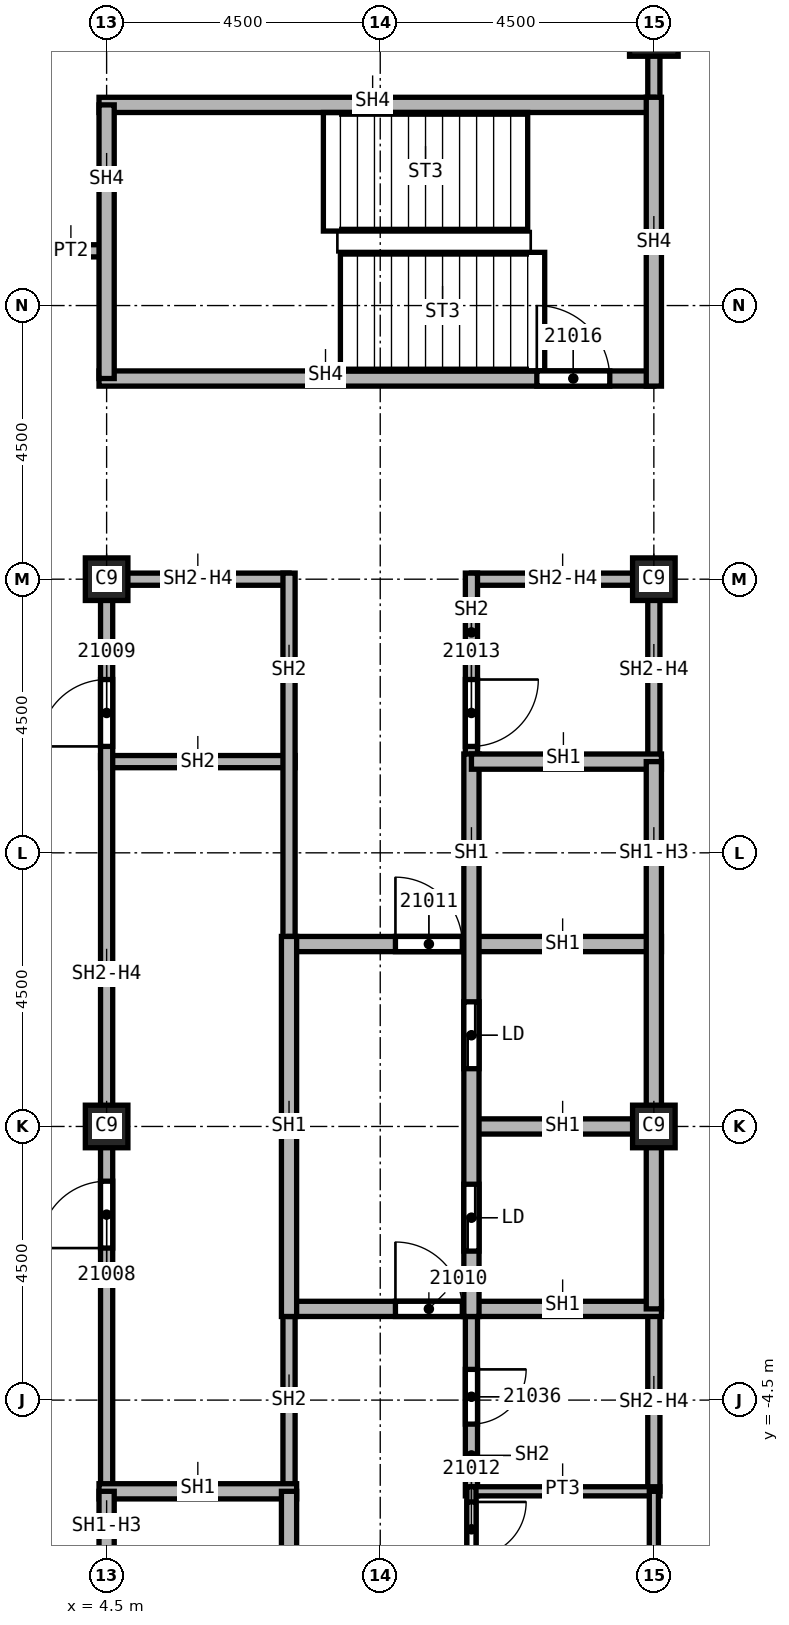
"""IFC4 building model, lengths in metres.
Left out: names, types, materials, properties, quantities, classifications, styles, units other than length and angle.
Written with IfcOpenShell. Run it as: python <this file> out.ifc"""

import sys

from ifc_helpers import new_model, si_unit, direction, frame, frame_2d, origin, origin_2d, place, context, subcontext, project, spatial, rectangle, extrude, element, fill, save


model = new_model("IFC4")
c1 = context("Model", 3, precision=1e-05, world=origin(), true_north=direction((0.0, 1.0)))
c2 = subcontext(c1, "Body", "Model", "MODEL_VIEW")
j1 = project(units=[si_unit("LENGTHUNIT", "METRE"), si_unit("PLANEANGLEUNIT", "RADIAN")], contexts=[c1])
p1 = place(None, origin())
s1 = spatial("IfcSite", under=j1, at=p1, CompositionType="ELEMENT")
p2 = place(p1, origin())
s2 = spatial("IfcBuilding", under=s1, at=p2, CompositionType="ELEMENT")
p3 = place(p2, frame((0.0, 0.0, 304.0)))
s3 = spatial("IfcBuildingStorey", under=s2, at=p3, CompositionType="ELEMENT", Elevation=304.0)
p4 = place(p3, frame((13.5, 18.0, 0.0), z_axis=(0.0, 0.0, 1.0), x_axis=(1.0, 0.0, 0.0)))
e1 = element("IfcColumn", 1, at=p4, inside=s3, PredefinedType="COLUMN", context=c2, shape_type="SweptSolid", body=[
    extrude(rectangle(XDim=0.8, YDim=0.8, at=origin_2d()), origin(), (0.0, 0.0, 1.0), 3.74),
])
for number, where, z_axis, x_axis in (
    (2, (4.5, 0.0, 0.0), (0.0, 0.0, 1.0), (1.0, 0.0, 0.0)),
    (3, (4.5, 9.0, 0.0), (0.0, 0.0, 1.0), (1.0, 0.0, 0.0)),
    (4, (13.5, 0.0, 0.0), (0.0, 0.0, 1.0), (1.0, 0.0, 0.0)),
    (5, (13.5, 9.0, 0.0), (0.0, 0.0, 1.0), (1.0, 0.0, 0.0)),
):
    element("IfcColumn", number, at=place(p3, frame(where, z_axis=z_axis, x_axis=x_axis)), inside=s3, PredefinedType="COLUMN", context=c2, shape_type="SweptSolid", body=[
        extrude(rectangle(XDim=0.7, YDim=0.7, at=origin_2d()), origin(), (0.0, 0.0, 1.0), 3.74),
    ])
p5 = place(p3, frame((3.45, 14.4, 0.0), z_axis=(0.0, 0.0, 1.0), x_axis=(1.0, 0.0, 0.0)))
e6 = element("IfcWall", 6, at=p5, inside=s3, PredefinedType="PARTITIONING", context=c2, shape_type="SweptSolid", body=[
    extrude(rectangle(XDim=1.05, YDim=0.2, at=frame_2d((0.525, 0.0))), origin(), (0.0, 0.0, 1.0), 3.74),
])
p6 = place(p3, frame((13.5, 16.675, 0.0), z_axis=(0.0, 0.0, 1.0), x_axis=(0.0, 1.0, 0.0)))
e7 = element("IfcWall", 7, at=p6, inside=s3, PredefinedType="PARTITIONING", context=c2, shape_type="SweptSolid", body=[
    extrude(rectangle(XDim=6.275, YDim=0.2, at=frame_2d((3.137, 0.0))), origin(), (0.0, 0.0, 1.0), 3.74),
])
p7 = place(p6, frame((2.65, 0.0, 0.0)))
e8 = element("IfcOpeningElement", 8, at=p7, cuts=e7, PredefinedType="OPENING", context=c2, shape_type="SweptSolid", body=[
    extrude(rectangle(XDim=1.0, YDim=2.1, at=frame_2d((0.5, 1.05))), frame((0.0, 0.1, 0.0), z_axis=(0.0, -1.0, 0.0), x_axis=(1.0, 0.0, 0.0)), (0.0, 0.0, 1.0), 0.2),
])
p8 = place(p3, frame((4.4, 6.0, 0.0), z_axis=(0.0, 0.0, 1.0), x_axis=(1.0, 0.0, 0.0)))
e9 = element("IfcWall", 9, at=p8, inside=s3, PredefinedType="SOLIDWALL", context=c2, shape_type="SweptSolid", body=[
    extrude(rectangle(XDim=3.2, YDim=0.2, at=frame_2d((1.6, 0.0))), origin(), (0.0, 0.0, 1.0), 3.74),
])
p9 = place(p3, frame((4.5, -6.0, 0.0), z_axis=(0.0, 0.0, 1.0), x_axis=(0.0, 1.0, 0.0)))
e10 = element("IfcWall", 10, at=p9, inside=s3, PredefinedType="SOLIDWALL", context=c2, shape_type="SweptSolid", body=[
    extrude(rectangle(XDim=15.1, YDim=0.2, at=frame_2d((7.55, 0.0))), origin(), (0.0, 0.0, 1.0), 3.062),
])
p10 = place(p9, frame((4.0, 0.0, 0.0)))
e11 = element("IfcOpeningElement", 11, at=p10, cuts=e10, PredefinedType="OPENING", context=c2, shape_type="SweptSolid", body=[
    extrude(rectangle(XDim=1.1, YDim=2.1, at=frame_2d((0.55, 1.05))), frame((0.0, 0.1, 0.0), z_axis=(0.0, -1.0, 0.0), x_axis=(1.0, 0.0, 0.0)), (0.0, 0.0, 1.0), 0.2),
])
p11 = place(p9, frame((12.25, 0.0, 0.0)))
e12 = element("IfcOpeningElement", 12, at=p11, cuts=e10, PredefinedType="OPENING", context=c2, shape_type="SweptSolid", body=[
    extrude(rectangle(XDim=1.1, YDim=2.1, at=frame_2d((0.55, 1.05))), frame((0.0, 0.1, 0.0), z_axis=(0.0, -1.0, 0.0), x_axis=(1.0, 0.0, 0.0)), (0.0, 0.0, 1.0), 0.2),
])
p12 = place(p3, frame((4.5, 9.0, 0.0), z_axis=(0.0, 0.0, 1.0), x_axis=(1.0, 0.0, 0.0)))
e13 = element("IfcWall", 13, at=p12, inside=s3, PredefinedType="SOLIDWALL", context=c2, shape_type="SweptSolid", body=[
    extrude(rectangle(XDim=3.0, YDim=0.2, at=frame_2d((1.5, 0.0))), origin(), (0.0, 0.0, 1.0), 3.062),
])
p13 = place(p3, frame((7.5, -2.875, 0.0), z_axis=(0.0, 0.0, 1.0), x_axis=(0.0, -1.0, 0.0)))
e14 = element("IfcWall", 14, at=p13, inside=s3, PredefinedType="SOLIDWALL", context=c2, shape_type="SweptSolid", body=[
    extrude(rectangle(XDim=3.125, YDim=0.2, at=frame_2d((1.562, 0.0))), origin(), (0.0, 0.0, 1.0), 3.74),
])
p14 = place(p3, frame((7.5, 9.1, 0.0), z_axis=(0.0, 0.0, 1.0), x_axis=(0.0, -1.0, 0.0)))
e15 = element("IfcWall", 15, at=p14, inside=s3, PredefinedType="SOLIDWALL", context=c2, shape_type="SweptSolid", body=[
    extrude(rectangle(XDim=6.225, YDim=0.2, at=frame_2d((3.113, 0.0))), origin(), (0.0, 0.0, 1.0), 3.74),
])
p15 = place(p3, frame((10.5, -2.875, 0.0), z_axis=(0.0, 0.0, 1.0), x_axis=(0.0, -1.0, 0.0)))
e16 = element("IfcWall", 16, at=p15, inside=s3, PredefinedType="SOLIDWALL", context=c2, shape_type="SweptSolid", body=[
    extrude(rectangle(XDim=3.2, YDim=0.2, at=frame_2d((1.6, 0.0))), origin(), (0.0, 0.0, 1.0), 3.74),
])
p16 = place(p15, frame((1.12, 0.0, 0.0)))
e17 = element("IfcOpeningElement", 17, at=p16, cuts=e16, PredefinedType="OPENING", context=c2, shape_type="SweptSolid", body=[
    extrude(rectangle(XDim=0.9, YDim=2.1, at=frame_2d((0.45, 1.05))), frame((0.0, 0.1, 0.0), z_axis=(0.0, -1.0, 0.0), x_axis=(1.0, 0.0, 0.0)), (0.0, 0.0, 1.0), 0.2),
])
p17 = place(p3, frame((10.5, 9.0, 0.0), z_axis=(0.0, 0.0, 1.0), x_axis=(1.0, 0.0, 0.0)))
e18 = element("IfcWall", 18, at=p17, inside=s3, PredefinedType="SOLIDWALL", context=c2, shape_type="SweptSolid", body=[
    extrude(rectangle(XDim=3.0, YDim=0.2, at=frame_2d((1.5, 0.0))), origin(), (0.0, 0.0, 1.0), 3.062),
])
p18 = place(p3, frame((10.5, 9.1, 0.0), z_axis=(0.0, 0.0, 1.0), x_axis=(0.0, -1.0, 0.0)))
e19 = element("IfcWall", 19, at=p18, inside=s3, PredefinedType="SOLIDWALL", context=c2, shape_type="SweptSolid", body=[
    extrude(rectangle(XDim=3.225, YDim=0.2, at=frame_2d((1.613, 0.0))), origin(), (0.0, 0.0, 1.0), 3.74),
])
p19 = place(p18, frame((1.75, 0.0, 0.0)))
e20 = element("IfcOpeningElement", 20, at=p19, cuts=e19, PredefinedType="OPENING", context=c2, shape_type="SweptSolid", body=[
    extrude(rectangle(XDim=1.1, YDim=2.1, at=frame_2d((0.55, 1.05))), frame((0.0, 0.1, 0.0), z_axis=(0.0, -1.0, 0.0), x_axis=(1.0, 0.0, 0.0)), (0.0, 0.0, 1.0), 0.2),
])
p20 = place(p3, frame((13.5, -3.0, 0.0), z_axis=(0.0, 0.0, 1.0), x_axis=(0.0, -1.0, 0.0)))
e21 = element("IfcWall", 21, at=p20, inside=s3, PredefinedType="SOLIDWALL", context=c2, shape_type="SweptSolid", body=[
    extrude(rectangle(XDim=3.0, YDim=0.2, at=frame_2d((1.5, 0.0))), origin(), (0.0, 0.0, 1.0), 3.062),
])
p21 = place(p3, frame((13.5, 9.1, 0.0), z_axis=(0.0, 0.0, 1.0), x_axis=(0.0, -1.0, 0.0)))
e22 = element("IfcWall", 22, at=p21, inside=s3, PredefinedType="SOLIDWALL", context=c2, shape_type="SweptSolid", body=[
    extrude(rectangle(XDim=3.1, YDim=0.2, at=frame_2d((1.55, 0.0))), origin(), (0.0, 0.0, 1.0), 3.062),
])
p22 = place(p3, frame((4.375, -6.0, 0.0), z_axis=(0.0, 0.0, 1.0), x_axis=(1.0, 0.0, 0.0)))
e23 = element("IfcWall", 23, at=p22, inside=s3, PredefinedType="SOLIDWALL", context=c2, shape_type="SweptSolid", body=[
    extrude(rectangle(XDim=3.25, YDim=0.25, at=frame_2d((1.625, 0.0))), origin(), (0.0, 0.0, 1.0), 3.74),
])
p23 = place(p3, frame((4.5, -9.125, 0.0), z_axis=(0.0, 0.0, 1.0), x_axis=(0.0, 1.0, 0.0)))
e24 = element("IfcWall", 24, at=p23, inside=s3, PredefinedType="SOLIDWALL", context=c2, shape_type="SweptSolid", body=[
    extrude(rectangle(XDim=3.125, YDim=0.25, at=frame_2d((1.562, 0.0))), origin(), (0.0, 0.0, 1.0), 3.062),
])
p24 = place(p23, frame((1.012, 0.0, 0.0)))
e25 = element("IfcOpeningElement", 25, at=p24, cuts=e24, PredefinedType="OPENING", context=c2, shape_type="SweptSolid", body=[
    extrude(rectangle(XDim=1.1, YDim=2.1, at=frame_2d((0.55, 1.05))), frame((0.0, 0.125, 0.0), z_axis=(0.0, -1.0, 0.0), x_axis=(1.0, 0.0, 0.0)), (0.0, 0.0, 1.0), 0.25),
])
p25 = place(p3, frame((7.5, -6.0, 0.0), z_axis=(0.0, 0.0, 1.0), x_axis=(0.0, -1.0, 0.0)))
e26 = element("IfcWall", 26, at=p25, inside=s3, PredefinedType="SOLIDWALL", context=c2, shape_type="SweptSolid", body=[
    extrude(rectangle(XDim=3.125, YDim=0.25, at=frame_2d((1.562, 0.0))), origin(), (0.0, 0.0, 1.0), 3.74),
])
p26 = place(p3, frame((7.5, -3.0, 0.0), z_axis=(0.0, 0.0, 1.0), x_axis=(1.0, 0.0, 0.0)))
e27 = element("IfcWall", 27, at=p26, inside=s3, PredefinedType="SOLIDWALL", context=c2, shape_type="SweptSolid", body=[
    extrude(rectangle(XDim=6.125, YDim=0.25, at=frame_2d((3.062, 0.0))), origin(), (0.0, 0.0, 1.0), 3.74),
])
p27 = place(p26, frame((1.75, 0.0, 0.0)))
e28 = element("IfcOpeningElement", 28, at=p27, cuts=e27, PredefinedType="OPENING", context=c2, shape_type="SweptSolid", body=[
    extrude(rectangle(XDim=1.1, YDim=2.1, at=frame_2d((0.55, 1.05))), frame((0.0, 0.125, 0.0), z_axis=(0.0, -1.0, 0.0), x_axis=(1.0, 0.0, 0.0)), (0.0, 0.0, 1.0), 0.25),
])
p28 = place(p3, frame((7.5, 3.0, 0.0), z_axis=(0.0, 0.0, 1.0), x_axis=(1.0, 0.0, 0.0)))
e29 = element("IfcWall", 29, at=p28, inside=s3, PredefinedType="SOLIDWALL", context=c2, shape_type="SweptSolid", body=[
    extrude(rectangle(XDim=6.125, YDim=0.25, at=frame_2d((3.062, 0.0))), origin(), (0.0, 0.0, 1.0), 3.74),
])
p29 = place(p28, frame((1.75, 0.0, 0.0)))
e30 = element("IfcOpeningElement", 30, at=p29, cuts=e29, PredefinedType="OPENING", context=c2, shape_type="SweptSolid", body=[
    extrude(rectangle(XDim=1.1, YDim=2.1, at=frame_2d((0.55, 1.05))), frame((0.0, 0.125, 0.0), z_axis=(0.0, -1.0, 0.0), x_axis=(1.0, 0.0, 0.0)), (0.0, 0.0, 1.0), 0.25),
])
p30 = place(p3, frame((7.5, 3.125, 0.0), z_axis=(0.0, 0.0, 1.0), x_axis=(0.0, -1.0, 0.0)))
e31 = element("IfcWall", 31, at=p30, inside=s3, PredefinedType="SOLIDWALL", context=c2, shape_type="SweptSolid", body=[
    extrude(rectangle(XDim=6.25, YDim=0.25, at=frame_2d((3.125, 0.0))), origin(), (0.0, 0.0, 1.0), 3.74),
])
p31 = place(p3, frame((10.5, 0.0, 0.0), z_axis=(0.0, 0.0, 1.0), x_axis=(1.0, 0.0, 0.0)))
e32 = element("IfcWall", 32, at=p31, inside=s3, PredefinedType="SOLIDWALL", context=c2, shape_type="SweptSolid", body=[
    extrude(rectangle(XDim=3.125, YDim=0.25, at=frame_2d((1.562, 0.0))), origin(), (0.0, 0.0, 1.0), 3.74),
])
p32 = place(p3, frame((10.5, 6.125, 0.0), z_axis=(0.0, 0.0, 1.0), x_axis=(0.0, -1.0, 0.0)))
e33 = element("IfcWall", 33, at=p32, inside=s3, PredefinedType="SOLIDWALL", context=c2, shape_type="SweptSolid", body=[
    extrude(rectangle(XDim=9.25, YDim=0.25, at=frame_2d((4.625, 0.0))), origin(), (0.0, 0.0, 1.0), 3.74),
])
p33 = place(p32, frame((7.075, 0.0, 0.0)))
e34 = element("IfcOpeningElement", 34, at=p33, cuts=e33, PredefinedType="OPENING", context=c2, shape_type="SweptSolid", body=[
    extrude(rectangle(XDim=1.1, YDim=2.1, at=frame_2d((0.55, 1.05))), frame((0.0, 0.125, 0.0), z_axis=(0.0, -1.0, 0.0), x_axis=(1.0, 0.0, 0.0)), (0.0, 0.0, 1.0), 0.25),
])
p34 = place(p32, frame((4.075, 0.0, 0.0)))
e35 = element("IfcOpeningElement", 35, at=p34, cuts=e33, PredefinedType="OPENING", context=c2, shape_type="SweptSolid", body=[
    extrude(rectangle(XDim=1.1, YDim=2.1, at=frame_2d((0.55, 1.05))), frame((0.0, 0.125, 0.0), z_axis=(0.0, -1.0, 0.0), x_axis=(1.0, 0.0, 0.0)), (0.0, 0.0, 1.0), 0.25),
])
p35 = place(p3, frame((10.5, 6.0, 0.0), z_axis=(0.0, 0.0, 1.0), x_axis=(1.0, 0.0, 0.0)))
e36 = element("IfcWall", 36, at=p35, inside=s3, PredefinedType="SOLIDWALL", context=c2, shape_type="SweptSolid", body=[
    extrude(rectangle(XDim=3.125, YDim=0.25, at=frame_2d((1.562, 0.0))), origin(), (0.0, 0.0, 1.0), 3.74),
])
p36 = place(p3, frame((13.5, 6.0, 0.0), z_axis=(0.0, 0.0, 1.0), x_axis=(0.0, -1.0, 0.0)))
e37 = element("IfcWall", 37, at=p36, inside=s3, PredefinedType="SOLIDWALL", context=c2, shape_type="SweptSolid", body=[
    extrude(rectangle(XDim=9.0, YDim=0.25, at=frame_2d((4.5, 0.0))), origin(), (0.0, 0.0, 1.0), 3.062),
])
p37 = place(p3, frame((4.375, 12.3, 0.0), z_axis=(0.0, 0.0, 1.0), x_axis=(1.0, 0.0, 0.0)))
e38 = element("IfcWall", 38, at=p37, inside=s3, PredefinedType="SOLIDWALL", context=c2, shape_type="SweptSolid", body=[
    extrude(rectangle(XDim=9.125, YDim=0.25, at=frame_2d((4.562, 0.0))), origin(), (0.0, 0.0, 1.0), 3.74),
])
p38 = place(p37, frame((7.2, 0.0, 0.0)))
e39 = element("IfcOpeningElement", 39, at=p38, cuts=e38, PredefinedType="OPENING", context=c2, shape_type="SweptSolid", body=[
    extrude(rectangle(XDim=1.2, YDim=2.1, at=frame_2d((0.6, 1.05))), frame((0.0, 0.125, 0.0), z_axis=(0.0, -1.0, 0.0), x_axis=(1.0, 0.0, 0.0)), (0.0, 0.0, 1.0), 0.25),
])
p39 = place(p3, frame((4.375, 16.8, 0.0), z_axis=(0.0, 0.0, 1.0), x_axis=(1.0, 0.0, 0.0)))
e40 = element("IfcWall", 40, at=p39, inside=s3, PredefinedType="SOLIDWALL", context=c2, shape_type="SweptSolid", body=[
    extrude(rectangle(XDim=9.125, YDim=0.25, at=frame_2d((4.562, 0.0))), origin(), (0.0, 0.0, 1.0), 3.74),
])
p40 = place(p3, frame((4.5, 12.3, 0.0), z_axis=(0.0, 0.0, 1.0), x_axis=(0.0, 1.0, 0.0)))
e41 = element("IfcWall", 41, at=p40, inside=s3, PredefinedType="SOLIDWALL", context=c2, shape_type="SweptSolid", body=[
    extrude(rectangle(XDim=4.5, YDim=0.25, at=frame_2d((2.25, 0.0))), origin(), (0.0, 0.0, 1.0), 3.74),
])
p41 = place(p3, frame((13.5, 12.175, 0.0), z_axis=(0.0, 0.0, 1.0), x_axis=(0.0, 1.0, 0.0)))
e42 = element("IfcWall", 42, at=p41, inside=s3, PredefinedType="SOLIDWALL", context=c2, shape_type="SweptSolid", body=[
    extrude(rectangle(XDim=4.75, YDim=0.25, at=frame_2d((2.375, 0.0))), origin(), (0.0, 0.0, 1.0), 3.74),
])
p42 = place(p3, frame((10.5, -6.0, 0.0), z_axis=(0.0, 0.0, 1.0), x_axis=(1.0, 0.0, 0.0)))
e43 = element("IfcWall", 43, at=p42, inside=s3, PredefinedType="PARTITIONING", context=c2, shape_type="SweptSolid", body=[
    extrude(rectangle(XDim=3.1, YDim=0.15, at=frame_2d((1.55, 0.0))), origin(), (0.0, 0.0, 1.0), 3.74),
])
p43 = place(p3, frame((10.5, -5.925, 0.0), z_axis=(0.0, 0.0, 1.0), x_axis=(0.0, -1.0, 0.0)))
e44 = element("IfcWall", 44, at=p43, inside=s3, PredefinedType="PARTITIONING", context=c2, shape_type="SweptSolid", body=[
    extrude(rectangle(XDim=3.15, YDim=0.15, at=frame_2d((1.575, 0.0))), origin(), (0.0, 0.0, 1.0), 3.74),
])
p44 = place(p43, frame((0.25, 0.0, 0.0)))
e45 = element("IfcOpeningElement", 45, at=p44, cuts=e44, PredefinedType="OPENING", context=c2, shape_type="SweptSolid", body=[
    extrude(rectangle(XDim=0.9, YDim=2.1, at=frame_2d((0.45, 1.05))), frame((0.0, 0.075, 0.0), z_axis=(0.0, -1.0, 0.0), x_axis=(1.0, 0.0, 0.0)), (0.0, 0.0, 1.0), 0.15),
])
p45 = place(p3, frame((13.5, -6.0, 0.0), z_axis=(0.0, 0.0, 1.0), x_axis=(0.0, -1.0, 0.0)))
e46 = element("IfcWall", 46, at=p45, inside=s3, PredefinedType="PARTITIONING", context=c2, shape_type="SweptSolid", body=[
    extrude(rectangle(XDim=3.075, YDim=0.15, at=frame_2d((1.538, 0.0))), origin(), (0.0, 0.0, 1.0), 3.062),
])
p46 = place(p10, origin())
e47 = element("IfcDoor", 47, at=p46, inside=s3, OperationType="SINGLE_SWING_LEFT", PredefinedType="DOOR", context=c2, shape_type="SweptSolid", body=[
    extrude(rectangle(XDim=1.1, YDim=2.1, at=frame_2d((0.55, 1.05))), frame((0.0, 0.025, 0.0), z_axis=(0.0, -1.0, 0.0), x_axis=(1.0, 0.0, 0.0)), (0.0, 0.0, 1.0), 0.05),
])
fill(e11, e47)
p47 = place(p11, origin())
e48 = element("IfcDoor", 48, at=p47, inside=s3, OperationType="SINGLE_SWING_RIGHT", PredefinedType="DOOR", context=c2, shape_type="SweptSolid", body=[
    extrude(rectangle(XDim=1.1, YDim=2.1, at=frame_2d((0.55, 1.05))), frame((0.0, 0.025, 0.0), z_axis=(0.0, -1.0, 0.0), x_axis=(1.0, 0.0, 0.0)), (0.0, 0.0, 1.0), 0.05),
])
fill(e12, e48)
p48 = place(p27, origin())
e49 = element("IfcDoor", 49, at=p48, inside=s3, OperationType="SINGLE_SWING_LEFT", PredefinedType="DOOR", context=c2, shape_type="SweptSolid", body=[
    extrude(rectangle(XDim=1.1, YDim=2.1, at=frame_2d((0.55, 1.05))), frame((0.0, 0.025, 0.0), z_axis=(0.0, -1.0, 0.0), x_axis=(1.0, 0.0, 0.0)), (0.0, 0.0, 1.0), 0.05),
])
fill(e28, e49)
p49 = place(p29, origin())
e50 = element("IfcDoor", 50, at=p49, inside=s3, OperationType="SINGLE_SWING_RIGHT", PredefinedType="DOOR", context=c2, shape_type="SweptSolid", body=[
    extrude(rectangle(XDim=1.1, YDim=2.1, at=frame_2d((0.55, 1.05))), frame((0.0, 0.025, 0.0), z_axis=(0.0, -1.0, 0.0), x_axis=(1.0, 0.0, 0.0)), (0.0, 0.0, 1.0), 0.05),
])
fill(e30, e50)
p50 = place(p44, origin())
e51 = element("IfcDoor", 51, at=p50, inside=s3, OperationType="SINGLE_SWING_LEFT", PredefinedType="DOOR", context=c2, shape_type="SweptSolid", body=[
    extrude(rectangle(XDim=0.9, YDim=2.1, at=frame_2d((0.45, 1.05))), frame((0.0, 0.025, 0.0), z_axis=(0.0, -1.0, 0.0), x_axis=(1.0, 0.0, 0.0)), (0.0, 0.0, 1.0), 0.05),
])
fill(e45, e51)
p51 = place(p19, origin())
e52 = element("IfcDoor", 52, at=p51, inside=s3, OperationType="SINGLE_SWING_RIGHT", PredefinedType="DOOR", context=c2, shape_type="SweptSolid", body=[
    extrude(rectangle(XDim=1.1, YDim=2.1, at=frame_2d((0.55, 1.05))), frame((0.0, 0.025, 0.0), z_axis=(0.0, -1.0, 0.0), x_axis=(1.0, 0.0, 0.0)), (0.0, 0.0, 1.0), 0.05),
])
fill(e20, e52)
p52 = place(p38, origin())
e53 = element("IfcDoor", 53, at=p52, inside=s3, OperationType="SINGLE_SWING_LEFT", PredefinedType="DOOR", context=c2, shape_type="SweptSolid", body=[
    extrude(rectangle(XDim=1.2, YDim=2.1, at=frame_2d((0.6, 1.05))), frame((0.0, 0.025, 0.0), z_axis=(0.0, -1.0, 0.0), x_axis=(1.0, 0.0, 0.0)), (0.0, 0.0, 1.0), 0.05),
])
fill(e39, e53)
p53 = place(p16, origin())
e54 = element("IfcDoor", 54, at=p53, inside=s3, OperationType="SINGLE_SWING_LEFT", PredefinedType="DOOR", context=c2, shape_type="SweptSolid", body=[
    extrude(rectangle(XDim=0.9, YDim=2.1, at=frame_2d((0.45, 1.05))), frame((0.0, 0.025, 0.0), z_axis=(0.0, -1.0, 0.0), x_axis=(1.0, 0.0, 0.0)), (0.0, 0.0, 1.0), 0.05),
])
fill(e17, e54)
p54 = place(p33, origin())
e55 = element("IfcDoor", 55, at=p54, inside=s3, OperationType="SLIDING_TO_LEFT", PredefinedType="DOOR", context=c2, shape_type="SweptSolid", body=[
    extrude(rectangle(XDim=1.1, YDim=2.1, at=frame_2d((0.55, 1.05))), frame((0.0, 0.025, 0.0), z_axis=(0.0, -1.0, 0.0), x_axis=(1.0, 0.0, 0.0)), (0.0, 0.0, 1.0), 0.05),
])
fill(e34, e55)
p55 = place(p34, origin())
e56 = element("IfcDoor", 56, at=p55, inside=s3, OperationType="SLIDING_TO_LEFT", PredefinedType="DOOR", context=c2, shape_type="SweptSolid", body=[
    extrude(rectangle(XDim=1.1, YDim=2.1, at=frame_2d((0.55, 1.05))), frame((0.0, 0.025, 0.0), z_axis=(0.0, -1.0, 0.0), x_axis=(1.0, 0.0, 0.0)), (0.0, 0.0, 1.0), 0.05),
])
fill(e35, e56)
save(model, sys.argv[1])
